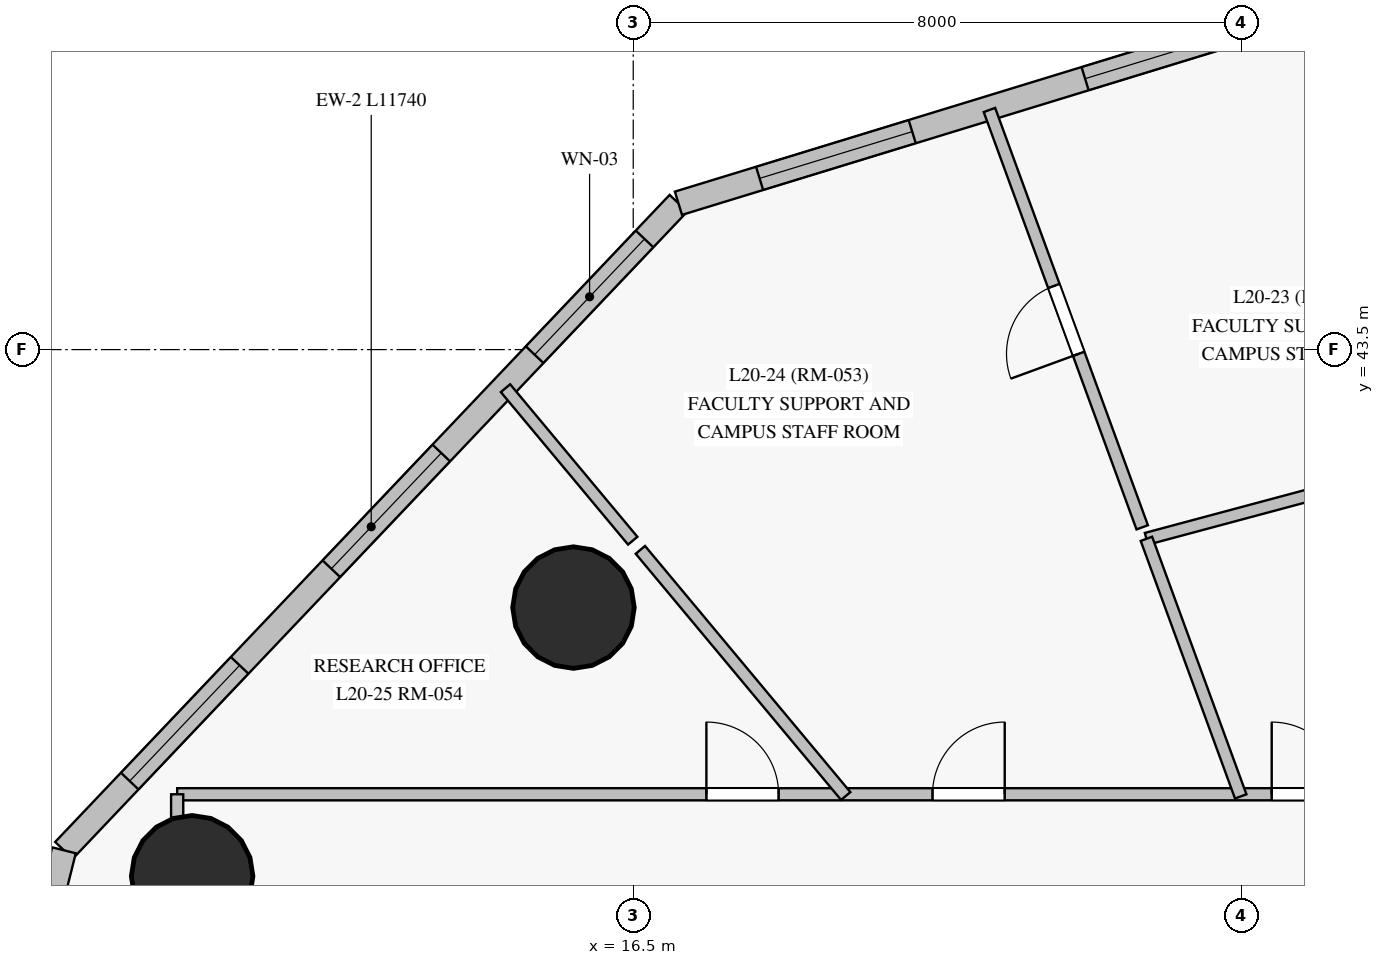
"""IFC4 building model, lengths in metres.
Left out: names, types, materials, properties, quantities, classifications, styles, units other than length and angle.
Written with IfcOpenShell. Run it as: python <this file> out.ifc"""

import sys

from ifc_helpers import new_model, si_unit, direction, frame, frame_2d, origin, origin_with_axes, origin_2d, place, context, subcontext, project, spatial, rectangle, circle, extrude, source, transform, mapped, element, fill, save


model = new_model("IFC4")
c1 = context("Model", 3, precision=1e-05, world=origin(), true_north=direction((0.0, 1.0)))
c2 = subcontext(c1, "Body", "Model", "MODEL_VIEW")
j1 = project(units=[si_unit("LENGTHUNIT", "METRE"), si_unit("PLANEANGLEUNIT", "RADIAN")], contexts=[c1])
p1 = place(None, origin())
s1 = spatial("IfcSite", under=j1, at=p1, CompositionType="ELEMENT")
p2 = place(p1, origin())
s2 = spatial("IfcBuilding", under=s1, at=p2, CompositionType="ELEMENT")
p3 = place(p2, frame((0.0, 0.0, 76.9)))
s3 = spatial("IfcBuildingStorey", under=s2, at=p3, CompositionType="ELEMENT", Elevation=76.9)
m1 = source(origin_with_axes(), c2, "Body", "SweptSolid", [
    extrude(circle(Radius=0.8, at=origin_2d()), origin(), (0.0, 0.0, 1.0), 3.6),
])
for number, where, z_axis, x_axis in (
    (1, (15.714, 40.106, 0.0), (0.0, 0.0, 1.0), (1.0, 0.0, 0.0)),
    (2, (10.697, 36.571, 0.0), (0.0, 0.0, 1.0), (1.0, 0.0, 0.0)),
):
    element("IfcColumn", number, at=place(p3, frame(where, z_axis=z_axis, x_axis=x_axis)), inside=s3, PredefinedType="COLUMN", context=c2, shape_type="MappedRepresentation", body=[
        mapped(m1, transform((0.0, 0.0, 0.0), scale=1.0)),
    ])
p4 = place(p3, frame((17.095, 45.426, 0.0), z_axis=(0.0, 0.0, 1.0), x_axis=(-0.688601333213, -0.725140127077, 0.0)))
e3 = element("IfcWall", 3, at=p4, inside=s3, PredefinedType="SOLIDWALL", context=c2, shape_type="SweptSolid", body=[
    extrude(rectangle(XDim=11.74, YDim=0.32, at=frame_2d((5.87, 0.0))), origin(), (0.0, 0.0, 1.0), 3.35),
])
p5 = place(p4, frame((0.648, 0.0, 0.85)))
e4 = element("IfcOpeningElement", 4, at=p5, cuts=e3, PredefinedType="OPENING", context=c2, shape_type="SweptSolid", body=[
    extrude(rectangle(XDim=2.1, YDim=1.95, at=frame_2d((1.05, 0.975))), frame((0.0, 0.17, 0.0), z_axis=(0.0, -1.0, 0.0), x_axis=(1.0, 0.0, 0.0)), (0.0, 0.0, 1.0), 0.34),
])
p6 = place(p4, frame((4.531, 0.0, 0.85)))
e5 = element("IfcOpeningElement", 5, at=p6, cuts=e3, PredefinedType="OPENING", context=c2, shape_type="SweptSolid", body=[
    extrude(rectangle(XDim=2.1, YDim=1.95, at=frame_2d((1.05, 0.975))), frame((0.0, 0.17, 0.0), z_axis=(0.0, -1.0, 0.0), x_axis=(1.0, 0.0, 0.0)), (0.0, 0.0, 1.0), 0.34),
])
p7 = place(p4, frame((8.384, 0.0, 0.85)))
e6 = element("IfcOpeningElement", 6, at=p7, cuts=e3, PredefinedType="OPENING", context=c2, shape_type="SweptSolid", body=[
    extrude(rectangle(XDim=2.1, YDim=1.95, at=frame_2d((1.05, 0.975))), frame((0.0, 0.17, 0.0), z_axis=(0.0, -1.0, 0.0), x_axis=(1.0, 0.0, 0.0)), (0.0, 0.0, 1.0), 0.34),
])
p8 = place(p3, frame((9.011, 36.913, 0.0), z_axis=(0.0, 0.0, 1.0), x_axis=(-0.243104924843, -0.969999997689, 0.0)))
e7 = element("IfcWall", 7, at=p8, inside=s3, PredefinedType="SOLIDWALL", context=c2, shape_type="SweptSolid", body=[
    extrude(rectangle(XDim=14.63, YDim=0.32, at=frame_2d((7.315, 0.0))), origin(), (0.0, 0.0, 1.0), 3.35),
])
p9 = place(p8, frame((1.277, 0.0, 0.85)))
e8 = element("IfcOpeningElement", 8, at=p9, cuts=e7, PredefinedType="OPENING", context=c2, shape_type="SweptSolid", body=[
    extrude(rectangle(XDim=2.1, YDim=1.95, at=frame_2d((1.05, 0.975))), frame((0.0, 0.17, 0.0), z_axis=(0.0, -1.0, 0.0), x_axis=(1.0, 0.0, 0.0)), (0.0, 0.0, 1.0), 0.34),
])
p10 = place(p8, frame((5.171, 0.0, 0.85)))
e9 = element("IfcOpeningElement", 9, at=p10, cuts=e7, PredefinedType="OPENING", context=c2, shape_type="SweptSolid", body=[
    extrude(rectangle(XDim=2.1, YDim=1.95, at=frame_2d((1.05, 0.975))), frame((0.0, 0.17, 0.0), z_axis=(0.0, -1.0, 0.0), x_axis=(1.0, 0.0, 0.0)), (0.0, 0.0, 1.0), 0.34),
])
p11 = place(p8, frame((9.065, 0.0, 0.85)))
e10 = element("IfcOpeningElement", 10, at=p11, cuts=e7, PredefinedType="OPENING", context=c2, shape_type="SweptSolid", body=[
    extrude(rectangle(XDim=2.1, YDim=1.95, at=frame_2d((1.05, 0.975))), frame((0.0, 0.17, 0.0), z_axis=(0.0, -1.0, 0.0), x_axis=(1.0, 0.0, 0.0)), (0.0, 0.0, 1.0), 0.34),
])
p12 = place(p3, frame((31.083, 49.71, 0.0), z_axis=(0.0, 0.0, 1.0), x_axis=(-0.956152758826, -0.292868403536, 0.0)))
e11 = element("IfcWall", 11, at=p12, inside=s3, PredefinedType="SOLIDWALL", context=c2, shape_type="SweptSolid", body=[
    extrude(rectangle(XDim=14.63, YDim=0.32, at=frame_2d((7.315, 0.0))), origin(), (0.0, 0.0, 1.0), 3.35),
])
p13 = place(p12, frame((2.831, 0.0, 0.85)))
e12 = element("IfcOpeningElement", 12, at=p13, cuts=e11, PredefinedType="OPENING", context=c2, shape_type="SweptSolid", body=[
    extrude(rectangle(XDim=2.1, YDim=1.95, at=frame_2d((1.05, 0.975))), frame((0.0, 0.17, 0.0), z_axis=(0.0, -1.0, 0.0), x_axis=(1.0, 0.0, 0.0)), (0.0, 0.0, 1.0), 0.34),
])
p14 = place(p12, frame((6.935, 0.0, 0.85)))
e13 = element("IfcOpeningElement", 13, at=p14, cuts=e11, PredefinedType="OPENING", context=c2, shape_type="SweptSolid", body=[
    extrude(rectangle(XDim=2.1, YDim=1.95, at=frame_2d((1.05, 0.975))), frame((0.0, 0.17, 0.0), z_axis=(0.0, -1.0, 0.0), x_axis=(1.0, 0.0, 0.0)), (0.0, 0.0, 1.0), 0.34),
])
p15 = place(p12, frame((11.414, 0.0, 0.85)))
e14 = element("IfcOpeningElement", 14, at=p15, cuts=e11, PredefinedType="OPENING", context=c2, shape_type="SweptSolid", body=[
    extrude(rectangle(XDim=2.1, YDim=1.95, at=frame_2d((1.05, 0.975))), frame((0.0, 0.17, 0.0), z_axis=(0.0, -1.0, 0.0), x_axis=(1.0, 0.0, 0.0)), (0.0, 0.0, 1.0), 0.34),
])
p16 = place(p3, frame((10.5, 37.65, 0.0), z_axis=(0.0, 0.0, 1.0), x_axis=(1.0, 0.0, 0.0)))
e15 = element("IfcWall", 15, at=p16, inside=s3, PredefinedType="PARTITIONING", context=c2, shape_type="SweptSolid", body=[
    extrude(rectangle(XDim=29.75, YDim=0.16, at=frame_2d((14.875, 0.0))), origin(), (0.0, 0.0, 1.0), 2.75),
])
p17 = place(p16, frame((26.208, 0.0, 0.0)))
e16 = element("IfcOpeningElement", 16, at=p17, cuts=e15, PredefinedType="OPENING", context=c2, shape_type="SweptSolid", body=[
    extrude(rectangle(XDim=0.95, YDim=2.15, at=frame_2d((0.475, 1.075))), frame((0.0, 0.09, 0.0), z_axis=(0.0, -1.0, 0.0), x_axis=(1.0, 0.0, 0.0)), (0.0, 0.0, 1.0), 0.18),
])
p18 = place(p16, frame((23.495, 0.0, 0.0)))
e17 = element("IfcOpeningElement", 17, at=p18, cuts=e15, PredefinedType="OPENING", context=c2, shape_type="SweptSolid", body=[
    extrude(rectangle(XDim=0.95, YDim=2.15, at=frame_2d((0.475, 1.075))), frame((0.0, 0.09, 0.0), z_axis=(0.0, -1.0, 0.0), x_axis=(1.0, 0.0, 0.0)), (0.0, 0.0, 1.0), 0.18),
])
p19 = place(p16, frame((14.4, 0.0, 0.0)))
e18 = element("IfcOpeningElement", 18, at=p19, cuts=e15, PredefinedType="OPENING", context=c2, shape_type="SweptSolid", body=[
    extrude(rectangle(XDim=0.95, YDim=2.15, at=frame_2d((0.475, 1.075))), frame((0.0, 0.09, 0.0), z_axis=(0.0, -1.0, 0.0), x_axis=(1.0, 0.0, 0.0)), (0.0, 0.0, 1.0), 0.18),
])
p20 = place(p16, frame((9.938, 0.0, 0.0)))
e19 = element("IfcOpeningElement", 19, at=p20, cuts=e15, PredefinedType="OPENING", context=c2, shape_type="SweptSolid", body=[
    extrude(rectangle(XDim=0.95, YDim=2.15, at=frame_2d((0.475, 1.075))), frame((0.0, 0.09, 0.0), z_axis=(0.0, -1.0, 0.0), x_axis=(1.0, 0.0, 0.0)), (0.0, 0.0, 1.0), 0.18),
])
p21 = place(p16, frame((6.962, 0.0, 0.0)))
e20 = element("IfcOpeningElement", 20, at=p21, cuts=e15, PredefinedType="OPENING", context=c2, shape_type="SweptSolid", body=[
    extrude(rectangle(XDim=0.95, YDim=2.15, at=frame_2d((0.475, 1.075))), frame((0.0, 0.09, 0.0), z_axis=(0.0, -1.0, 0.0), x_axis=(1.0, 0.0, 0.0)), (0.0, 0.0, 1.0), 0.18),
])
p22 = place(p3, frame((10.5, 15.35, 0.0), z_axis=(0.0, 0.0, 1.0), x_axis=(0.0, 1.0, 0.0)))
e21 = element("IfcWall", 21, at=p22, inside=s3, PredefinedType="PARTITIONING", context=c2, shape_type="SweptSolid", body=[
    extrude(rectangle(XDim=22.3, YDim=0.16, at=frame_2d((11.15, 0.0))), origin(), (0.0, 0.0, 1.0), 2.75),
])
p23 = place(p22, frame((7.33, 0.0, 0.0)))
e22 = element("IfcOpeningElement", 22, at=p23, cuts=e21, PredefinedType="OPENING", context=c2, shape_type="SweptSolid", body=[
    extrude(rectangle(XDim=0.95, YDim=2.15, at=frame_2d((0.475, 1.075))), frame((0.0, 0.09, 0.0), z_axis=(0.0, -1.0, 0.0), x_axis=(1.0, 0.0, 0.0)), (0.0, 0.0, 1.0), 0.18),
])
p24 = place(p22, frame((10.675, 0.0, 0.0)))
e23 = element("IfcOpeningElement", 23, at=p24, cuts=e21, PredefinedType="OPENING", context=c2, shape_type="SweptSolid", body=[
    extrude(rectangle(XDim=0.95, YDim=2.15, at=frame_2d((0.475, 1.075))), frame((0.0, 0.09, 0.0), z_axis=(0.0, -1.0, 0.0), x_axis=(1.0, 0.0, 0.0)), (0.0, 0.0, 1.0), 0.18),
])
p25 = place(p3, frame((23.196, 41.162, 0.0), z_axis=(0.0, 0.0, 1.0), x_axis=(-0.343750376803, 0.939061062151, 0.0)))
e24 = element("IfcWall", 24, at=p25, inside=s3, PredefinedType="PARTITIONING", context=c2, shape_type="SweptSolid", body=[
    extrude(rectangle(XDim=5.847, YDim=0.16, at=frame_2d((2.924, 0.0))), origin(), (0.0, 0.0, 1.0), 3.35),
])
p26 = place(p25, frame((2.431, 0.0, 0.0)))
e25 = element("IfcOpeningElement", 25, at=p26, cuts=e24, PredefinedType="OPENING", context=c2, shape_type="SweptSolid", body=[
    extrude(rectangle(XDim=0.95, YDim=2.15, at=frame_2d((0.475, 1.075))), frame((0.0, 0.09, 0.0), z_axis=(0.0, -1.0, 0.0), x_axis=(1.0, 0.0, 0.0)), (0.0, 0.0, 1.0), 0.18),
])
p27 = place(p3, frame((23.252, 41.011, 0.0), z_axis=(0.0, 0.0, 1.0), x_axis=(0.965925777149, 0.258819228495, 0.0)))
e26 = element("IfcWall", 26, at=p27, inside=s3, PredefinedType="PARTITIONING", context=c2, shape_type="SweptSolid", body=[
    extrude(rectangle(XDim=6.213, YDim=0.16, at=frame_2d((3.107, 0.0))), origin(), (0.0, 0.0, 1.0), 3.35),
])
p28 = place(p3, frame((19.296, 37.627, 0.0), z_axis=(0.0, 0.0, 1.0), x_axis=(-0.64061705383, 0.767860527923, 0.0)))
e27 = element("IfcWall", 27, at=p28, inside=s3, PredefinedType="PARTITIONING", context=c2, shape_type="SweptSolid", body=[
    extrude(rectangle(XDim=4.217, YDim=0.16, at=frame_2d((2.109, 0.0))), origin(), (0.0, 0.0, 1.0), 3.35),
])
p29 = place(p3, frame((24.492, 37.622, 0.0), z_axis=(0.0, 0.0, 1.0), x_axis=(-0.343713946851, 0.939074396808, 0.0)))
e28 = element("IfcWall", 28, at=p29, inside=s3, PredefinedType="PARTITIONING", context=c2, shape_type="SweptSolid", body=[
    extrude(rectangle(XDim=3.609, YDim=0.16, at=frame_2d((1.805, 0.0))), origin(), (0.0, 0.0, 1.0), 3.35),
])
p30 = place(p3, frame((16.493, 40.986, 0.0), z_axis=(0.0, 0.0, 1.0), x_axis=(-0.640607068833, 0.767868858179, 0.0)))
e29 = element("IfcWall", 29, at=p30, inside=s3, PredefinedType="PARTITIONING", context=c2, shape_type="SweptSolid", body=[
    extrude(rectangle(XDim=2.613, YDim=0.16, at=frame_2d((1.306, 0.0))), origin(), (0.0, 0.0, 1.0), 3.35),
])
m2 = source(origin_with_axes(), c2, "Body", "SweptSolid", [
    extrude(rectangle(XDim=2.1, YDim=1.95, at=frame_2d((1.05, 0.975))), frame((0.0, 0.03, 0.0), z_axis=(0.0, -1.0, 0.0), x_axis=(1.0, 0.0, 0.0)), (0.0, 0.0, 1.0), 0.06),
])
p31 = place(p5, origin())
e30 = element("IfcWindow", 30, at=p31, inside=s3, PartitioningType="SINGLE_PANEL", PredefinedType="WINDOW", context=c2, shape_type="MappedRepresentation", body=[
    mapped(m2, transform((0.0, 0.0, 0.0), scale=1.0)),
])
fill(e4, e30)
p32 = place(p6, origin())
e31 = element("IfcWindow", 31, at=p32, inside=s3, PartitioningType="SINGLE_PANEL", PredefinedType="WINDOW", context=c2, shape_type="MappedRepresentation", body=[
    mapped(m2, transform((0.0, 0.0, 0.0), scale=1.0)),
])
fill(e5, e31)
p33 = place(p7, origin())
e32 = element("IfcWindow", 32, at=p33, inside=s3, PartitioningType="SINGLE_PANEL", PredefinedType="WINDOW", context=c2, shape_type="MappedRepresentation", body=[
    mapped(m2, transform((0.0, 0.0, 0.0), scale=1.0)),
])
fill(e6, e32)
p34 = place(p14, origin())
e33 = element("IfcWindow", 33, at=p34, inside=s3, PartitioningType="SINGLE_PANEL", PredefinedType="WINDOW", context=c2, shape_type="MappedRepresentation", body=[
    mapped(m2, transform((0.0, 0.0, 0.0), scale=1.0)),
])
fill(e13, e33)
p35 = place(p15, origin())
e34 = element("IfcWindow", 34, at=p35, inside=s3, PartitioningType="SINGLE_PANEL", PredefinedType="WINDOW", context=c2, shape_type="MappedRepresentation", body=[
    mapped(m2, transform((0.0, 0.0, 0.0), scale=1.0)),
])
fill(e14, e34)
m3 = source(origin_with_axes(), c2, "Body", "SweptSolid", [
    extrude(rectangle(XDim=0.95, YDim=2.15, at=frame_2d((0.475, 1.075))), frame((0.0, 0.025, 0.0), z_axis=(0.0, -1.0, 0.0), x_axis=(1.0, 0.0, 0.0)), (0.0, 0.0, 1.0), 0.05),
])
p36 = place(p19, origin())
e35 = element("IfcDoor", 35, at=p36, inside=s3, OperationType="SINGLE_SWING_LEFT", PredefinedType="DOOR", context=c2, shape_type="MappedRepresentation", body=[
    mapped(m3, transform((0.0, 0.0, 0.0), scale=1.0)),
])
fill(e18, e35)
p37 = place(p20, origin())
e36 = element("IfcDoor", 36, at=p37, inside=s3, OperationType="SINGLE_SWING_RIGHT", PredefinedType="DOOR", context=c2, shape_type="MappedRepresentation", body=[
    mapped(m3, transform((0.0, 0.0, 0.0), scale=1.0)),
])
fill(e19, e36)
p38 = place(p21, origin())
e37 = element("IfcDoor", 37, at=p38, inside=s3, OperationType="SINGLE_SWING_LEFT", PredefinedType="DOOR", context=c2, shape_type="MappedRepresentation", body=[
    mapped(m3, transform((0.0, 0.0, 0.0), scale=1.0)),
])
fill(e20, e37)
p39 = place(p26, origin())
e38 = element("IfcDoor", 38, at=p39, inside=s3, OperationType="SINGLE_SWING_LEFT", PredefinedType="DOOR", context=c2, shape_type="MappedRepresentation", body=[
    mapped(m3, transform((0.0, 0.0, 0.0), scale=1.0)),
])
fill(e25, e38)
save(model, sys.argv[1])
